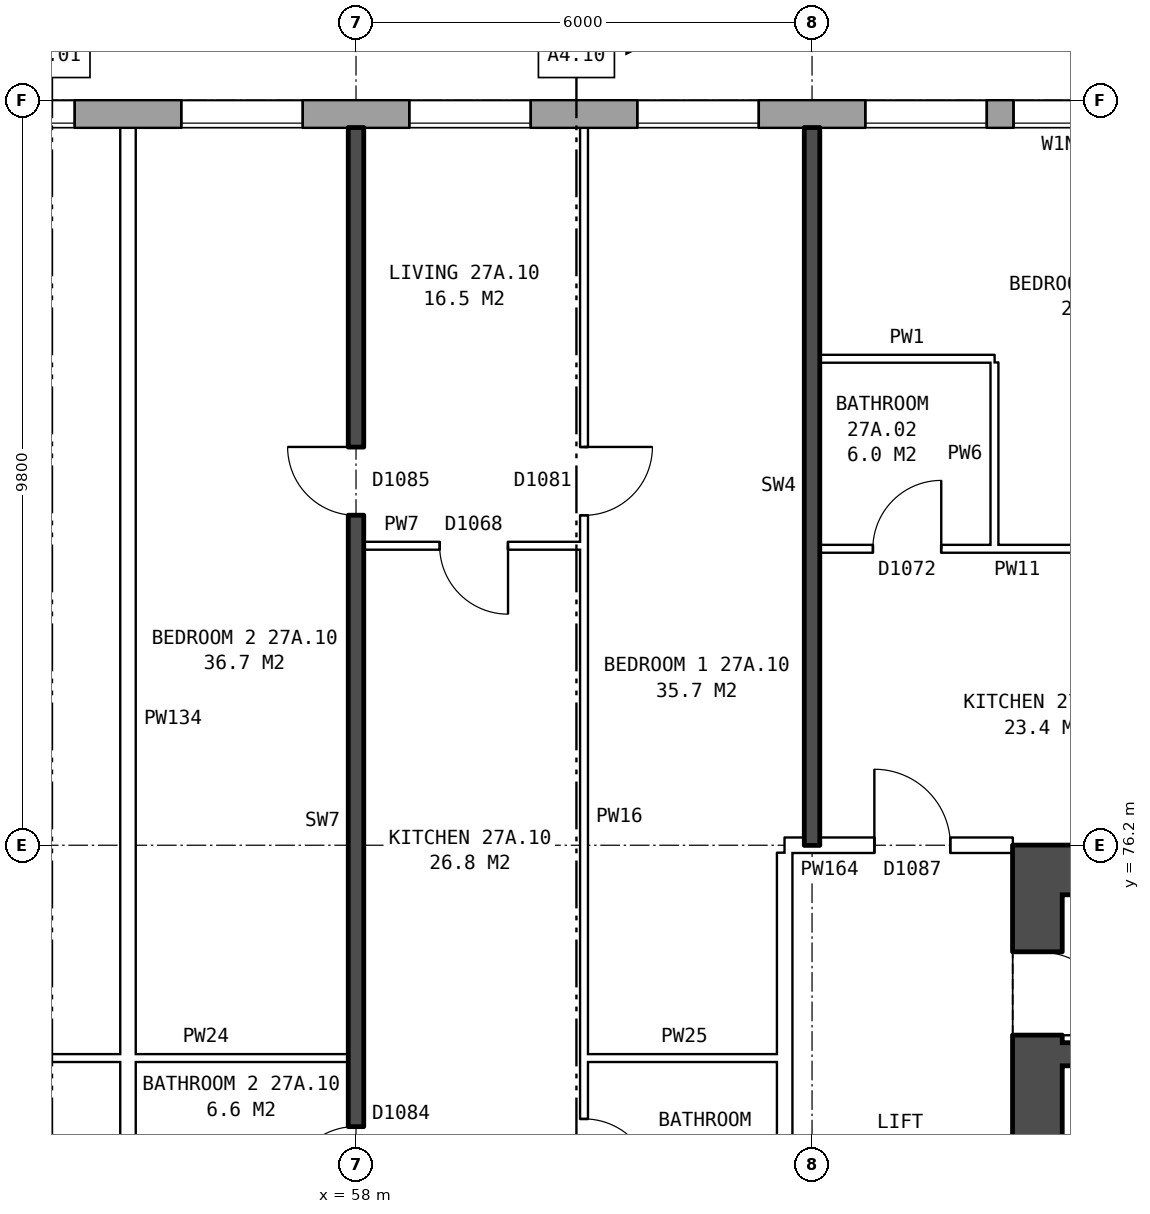
"""IFC4 building model, lengths in metres.
Left out: names, types, materials, properties, quantities, classifications, styles, units other than length and angle.
Written with IfcOpenShell. Run it as: python <this file> out.ifc"""

import sys

from ifc_helpers import new_model, si_unit, direction, frame, frame_2d, origin, place, context, subcontext, project, spatial, rectangle, extrude, element, fill, save


model = new_model("IFC4")
c1 = context("Model", 3, precision=1e-05, world=origin(), true_north=direction((0.0, 1.0)))
c2 = subcontext(c1, "Body", "Model", "MODEL_VIEW")
j1 = project(units=[si_unit("LENGTHUNIT", "METRE"), si_unit("PLANEANGLEUNIT", "RADIAN")], contexts=[c1])
p1 = place(None, origin())
s1 = spatial("IfcSite", under=j1, at=p1, CompositionType="ELEMENT")
p2 = place(p1, origin())
s2 = spatial("IfcBuilding", under=s1, at=p2, CompositionType="ELEMENT")
p3 = place(p2, frame((0.0, 0.0, 99.5)))
s3 = spatial("IfcBuildingStorey", under=s2, at=p3, CompositionType="ELEMENT", Elevation=99.5)
p4 = place(p3, frame((72.925, 85.82, 0.0), z_axis=(0.0, 0.0, 1.0), x_axis=(-1.0, 0.0, 0.0)))
e1 = element("IfcWall", 1, at=p4, inside=s3, PredefinedType="STANDARD", context=c2, shape_type="SweptSolid", body=[
    extrude(rectangle(XDim=44.851, YDim=0.36, at=frame_2d((22.425, 0.0))), origin(), (0.0, 0.0, 1.0), 2.85),
])
p5 = place(p4, frame((0.625, 0.0, 0.8)))
e2 = element("IfcOpeningElement", 2, at=p5, cuts=e1, PredefinedType="OPENING", context=c2, shape_type="SweptSolid", body=[
    extrude(rectangle(XDim=1.6, YDim=1.8, at=frame_2d((0.8, 0.9))), frame((0.0, 0.19, 0.0), z_axis=(0.0, -1.0, 0.0), x_axis=(1.0, 0.0, 0.0)), (0.0, 0.0, 1.0), 0.38),
])
p6 = place(p4, frame((5.075, 0.0, 0.8)))
e3 = element("IfcOpeningElement", 3, at=p6, cuts=e1, PredefinedType="OPENING", context=c2, shape_type="SweptSolid", body=[
    extrude(rectangle(XDim=1.2, YDim=1.2, at=frame_2d((0.6, 0.6))), frame((0.0, 0.19, 0.0), z_axis=(0.0, -1.0, 0.0), x_axis=(1.0, 0.0, 0.0)), (0.0, 0.0, 1.0), 0.38),
])
p7 = place(p4, frame((6.625, 0.0, 0.8)))
e4 = element("IfcOpeningElement", 4, at=p7, cuts=e1, PredefinedType="OPENING", context=c2, shape_type="SweptSolid", body=[
    extrude(rectangle(XDim=1.6, YDim=1.8, at=frame_2d((0.8, 0.9))), frame((0.0, 0.19, 0.0), z_axis=(0.0, -1.0, 0.0), x_axis=(1.0, 0.0, 0.0)), (0.0, 0.0, 1.0), 0.38),
])
p8 = place(p4, frame((9.625, 0.0, 0.8)))
e5 = element("IfcOpeningElement", 5, at=p8, cuts=e1, PredefinedType="OPENING", context=c2, shape_type="SweptSolid", body=[
    extrude(rectangle(XDim=1.6, YDim=1.8, at=frame_2d((0.8, 0.9))), frame((0.0, 0.19, 0.0), z_axis=(0.0, -1.0, 0.0), x_axis=(1.0, 0.0, 0.0)), (0.0, 0.0, 1.0), 0.38),
])
p9 = place(p4, frame((12.625, 0.0, 0.8)))
e6 = element("IfcOpeningElement", 6, at=p9, cuts=e1, PredefinedType="OPENING", context=c2, shape_type="SweptSolid", body=[
    extrude(rectangle(XDim=1.6, YDim=1.8, at=frame_2d((0.8, 0.9))), frame((0.0, 0.19, 0.0), z_axis=(0.0, -1.0, 0.0), x_axis=(1.0, 0.0, 0.0)), (0.0, 0.0, 1.0), 0.38),
])
p10 = place(p4, frame((15.625, 0.0, 0.8)))
e7 = element("IfcOpeningElement", 7, at=p10, cuts=e1, PredefinedType="OPENING", context=c2, shape_type="SweptSolid", body=[
    extrude(rectangle(XDim=1.6, YDim=1.8, at=frame_2d((0.8, 0.9))), frame((0.0, 0.19, 0.0), z_axis=(0.0, -1.0, 0.0), x_axis=(1.0, 0.0, 0.0)), (0.0, 0.0, 1.0), 0.38),
])
p11 = place(p4, frame((18.625, 0.0, 0.8)))
e8 = element("IfcOpeningElement", 8, at=p11, cuts=e1, PredefinedType="OPENING", context=c2, shape_type="SweptSolid", body=[
    extrude(rectangle(XDim=1.6, YDim=1.8, at=frame_2d((0.8, 0.9))), frame((0.0, 0.19, 0.0), z_axis=(0.0, -1.0, 0.0), x_axis=(1.0, 0.0, 0.0)), (0.0, 0.0, 1.0), 0.38),
])
p12 = place(p4, frame((21.625, 0.0, 0.8)))
e9 = element("IfcOpeningElement", 9, at=p12, cuts=e1, PredefinedType="OPENING", context=c2, shape_type="SweptSolid", body=[
    extrude(rectangle(XDim=1.6, YDim=1.8, at=frame_2d((0.8, 0.9))), frame((0.0, 0.19, 0.0), z_axis=(0.0, -1.0, 0.0), x_axis=(1.0, 0.0, 0.0)), (0.0, 0.0, 1.0), 0.38),
])
p13 = place(p4, frame((24.625, 0.0, 0.8)))
e10 = element("IfcOpeningElement", 10, at=p13, cuts=e1, PredefinedType="OPENING", context=c2, shape_type="SweptSolid", body=[
    extrude(rectangle(XDim=1.6, YDim=1.8, at=frame_2d((0.8, 0.9))), frame((0.0, 0.19, 0.0), z_axis=(0.0, -1.0, 0.0), x_axis=(1.0, 0.0, 0.0)), (0.0, 0.0, 1.0), 0.38),
])
p14 = place(p4, frame((27.625, 0.0, 0.8)))
e11 = element("IfcOpeningElement", 11, at=p14, cuts=e1, PredefinedType="OPENING", context=c2, shape_type="SweptSolid", body=[
    extrude(rectangle(XDim=1.6, YDim=1.8, at=frame_2d((0.8, 0.9))), frame((0.0, 0.19, 0.0), z_axis=(0.0, -1.0, 0.0), x_axis=(1.0, 0.0, 0.0)), (0.0, 0.0, 1.0), 0.38),
])
p15 = place(p4, frame((30.625, 0.0, 0.8)))
e12 = element("IfcOpeningElement", 12, at=p15, cuts=e1, PredefinedType="OPENING", context=c2, shape_type="SweptSolid", body=[
    extrude(rectangle(XDim=1.6, YDim=1.8, at=frame_2d((0.8, 0.9))), frame((0.0, 0.19, 0.0), z_axis=(0.0, -1.0, 0.0), x_axis=(1.0, 0.0, 0.0)), (0.0, 0.0, 1.0), 0.38),
])
p16 = place(p4, frame((33.625, 0.0, 0.8)))
e13 = element("IfcOpeningElement", 13, at=p16, cuts=e1, PredefinedType="OPENING", context=c2, shape_type="SweptSolid", body=[
    extrude(rectangle(XDim=1.6, YDim=1.8, at=frame_2d((0.8, 0.9))), frame((0.0, 0.19, 0.0), z_axis=(0.0, -1.0, 0.0), x_axis=(1.0, 0.0, 0.0)), (0.0, 0.0, 1.0), 0.38),
])
p17 = place(p4, frame((36.625, 0.0, 0.8)))
e14 = element("IfcOpeningElement", 14, at=p17, cuts=e1, PredefinedType="OPENING", context=c2, shape_type="SweptSolid", body=[
    extrude(rectangle(XDim=1.6, YDim=1.8, at=frame_2d((0.8, 0.9))), frame((0.0, 0.19, 0.0), z_axis=(0.0, -1.0, 0.0), x_axis=(1.0, 0.0, 0.0)), (0.0, 0.0, 1.0), 0.38),
])
p18 = place(p4, frame((39.125, 0.0, 0.8)))
e15 = element("IfcOpeningElement", 15, at=p18, cuts=e1, PredefinedType="OPENING", context=c2, shape_type="SweptSolid", body=[
    extrude(rectangle(XDim=1.0, YDim=0.9, at=frame_2d((0.5, 0.45))), frame((0.0, 0.19, 0.0), z_axis=(0.0, -1.0, 0.0), x_axis=(1.0, 0.0, 0.0)), (0.0, 0.0, 1.0), 0.38),
])
p19 = place(p4, frame((42.625, 0.0, 0.8)))
e16 = element("IfcOpeningElement", 16, at=p19, cuts=e1, PredefinedType="OPENING", context=c2, shape_type="SweptSolid", body=[
    extrude(rectangle(XDim=1.6, YDim=1.8, at=frame_2d((0.8, 0.9))), frame((0.0, 0.19, 0.0), z_axis=(0.0, -1.0, 0.0), x_axis=(1.0, 0.0, 0.0)), (0.0, 0.0, 1.0), 0.38),
])
p20 = place(p4, frame((41.425, 0.0, 1.7)))
e17 = element("IfcOpeningElement", 17, at=p20, cuts=e1, PredefinedType="OPENING", context=c2, shape_type="SweptSolid", body=[
    extrude(rectangle(XDim=0.8, YDim=0.9, at=frame_2d((0.4, 0.45))), frame((0.0, 0.19, 0.0), z_axis=(0.0, -1.0, 0.0), x_axis=(1.0, 0.0, 0.0)), (0.0, 0.0, 1.0), 0.38),
])
p21 = place(p3, frame((66.965, 64.45, 0.0), z_axis=(0.0, 0.0, 1.0), x_axis=(0.0, 1.0, 0.0)))
e18 = element("IfcWall", 18, at=p21, inside=s3, PredefinedType="SHEAR", context=c2, shape_type="SweptSolid", body=[
    extrude(rectangle(XDim=11.1, YDim=0.65, at=frame_2d((5.55, 0.0))), origin(), (0.0, 0.0, 1.0), 2.85),
])
p22 = place(p21, frame((0.675, 0.0, 0.0)))
e19 = element("IfcOpeningElement", 19, at=p22, cuts=e18, PredefinedType="OPENING", context=c2, shape_type="SweptSolid", body=[
    extrude(rectangle(XDim=1.1, YDim=2.1, at=frame_2d((0.55, 1.05))), frame((0.0, 0.335, 0.0), z_axis=(0.0, -1.0, 0.0), x_axis=(1.0, 0.0, 0.0)), (0.0, 0.0, 1.0), 0.67),
])
p23 = place(p21, frame((9.25, 0.0, 0.0)))
e20 = element("IfcOpeningElement", 20, at=p23, cuts=e18, PredefinedType="OPENING", context=c2, shape_type="SweptSolid", body=[
    extrude(rectangle(XDim=1.1, YDim=2.1, at=frame_2d((0.55, 1.05))), frame((0.0, 0.335, 0.0), z_axis=(0.0, -1.0, 0.0), x_axis=(1.0, 0.0, 0.0)), (0.0, 0.0, 1.0), 0.67),
])
p24 = place(p3, frame((66.64, 75.875, 0.0), z_axis=(0.0, 0.0, 1.0), x_axis=(1.0, 0.0, 0.0)))
e21 = element("IfcWall", 21, at=p24, inside=s3, PredefinedType="SHEAR", context=c2, shape_type="SweptSolid", body=[
    extrude(rectangle(XDim=9.0, YDim=0.65, at=frame_2d((4.5, 0.0))), origin(), (0.0, 0.0, 1.0), 2.85),
])
p25 = place(p3, frame((67.29, 73.45, 0.0), z_axis=(0.0, 0.0, 1.0), x_axis=(1.0, 0.0, 0.0)))
e22 = element("IfcWall", 22, at=p25, inside=s3, PredefinedType="SHEAR", context=c2, shape_type="SweptSolid", body=[
    extrude(rectangle(XDim=2.25, YDim=0.3, at=frame_2d((1.125, 0.0))), origin(), (0.0, 0.0, 1.0), 2.85),
])
p26 = place(p3, frame((63.64, 63.9, 0.0), z_axis=(0.0, 0.0, 1.0), x_axis=(0.0, 1.0, 0.0)))
e23 = element("IfcWall", 23, at=p26, inside=s3, PredefinedType="PARTITIONING", context=c2, shape_type="SweptSolid", body=[
    extrude(rectangle(XDim=12.2, YDim=0.2, at=frame_2d((6.1, 0.0))), origin(), (0.0, 0.0, 1.0), 2.85),
])
p27 = place(p26, frame((5.1, 0.0, 0.0)))
e24 = element("IfcOpeningElement", 24, at=p27, cuts=e23, PredefinedType="OPENING", context=c2, shape_type="SweptSolid", body=[
    extrude(rectangle(XDim=2.0, YDim=2.1, at=frame_2d((1.0, 1.05))), frame((0.0, 0.11, 0.0), z_axis=(0.0, -1.0, 0.0), x_axis=(1.0, 0.0, 0.0)), (0.0, 0.0, 1.0), 0.22),
])
p28 = place(p3, frame((52.1, 73.4, 0.0), z_axis=(0.0, 0.0, 1.0), x_axis=(1.0, 0.0, 0.0)))
e25 = element("IfcWall", 25, at=p28, inside=s3, PredefinedType="PARTITIONING", context=c2, shape_type="SweptSolid", body=[
    extrude(rectangle(XDim=5.8, YDim=0.1, at=frame_2d((2.9, 0.0))), origin(), (0.0, 0.0, 1.0), 2.85),
])
p29 = place(p3, frame((61.0, 73.4, 0.0), z_axis=(0.0, 0.0, 1.0), x_axis=(1.0, 0.0, 0.0)))
e26 = element("IfcWall", 26, at=p29, inside=s3, PredefinedType="PARTITIONING", context=c2, shape_type="SweptSolid", body=[
    extrude(rectangle(XDim=2.64, YDim=0.1, at=frame_2d((1.32, 0.0))), origin(), (0.0, 0.0, 1.0), 2.85),
])
p30 = place(p3, frame((63.64, 76.2, 0.0), z_axis=(0.0, 0.0, 1.0), x_axis=(1.0, 0.0, 0.0)))
e27 = element("IfcWall", 27, at=p30, inside=s3, PredefinedType="PARTITIONING", context=c2, shape_type="SweptSolid", body=[
    extrude(rectangle(XDim=3.0, YDim=0.2, at=frame_2d((1.5, 0.0))), origin(), (0.0, 0.0, 1.0), 2.85),
])
p31 = place(p30, frame((1.18, 0.0, 0.0)))
e28 = element("IfcOpeningElement", 28, at=p31, cuts=e27, PredefinedType="OPENING", context=c2, shape_type="SweptSolid", body=[
    extrude(rectangle(XDim=1.0, YDim=2.1, at=frame_2d((0.5, 1.05))), frame((0.0, 0.11, 0.0), z_axis=(0.0, -1.0, 0.0), x_axis=(1.0, 0.0, 0.0)), (0.0, 0.0, 1.0), 0.22),
])
p32 = place(p3, frame((64.1, 80.1, 0.0), z_axis=(0.0, 0.0, 1.0), x_axis=(1.0, 0.0, 0.0)))
e29 = element("IfcWall", 29, at=p32, inside=s3, PredefinedType="PARTITIONING", context=c2, shape_type="SweptSolid", body=[
    extrude(rectangle(XDim=5.8, YDim=0.1, at=frame_2d((2.9, 0.0))), origin(), (0.0, 0.0, 1.0), 2.85),
])
p33 = place(p32, frame((3.6, 0.0, 0.0)))
e30 = element("IfcOpeningElement", 30, at=p33, cuts=e29, PredefinedType="OPENING", context=c2, shape_type="SweptSolid", body=[
    extrude(rectangle(XDim=0.9, YDim=2.1, at=frame_2d((0.45, 1.05))), frame((0.0, 0.06, 0.0), z_axis=(0.0, -1.0, 0.0), x_axis=(1.0, 0.0, 0.0)), (0.0, 0.0, 1.0), 0.12),
])
p34 = place(p32, frame((0.7, 0.0, 0.0)))
e31 = element("IfcOpeningElement", 31, at=p34, cuts=e29, PredefinedType="OPENING", context=c2, shape_type="SweptSolid", body=[
    extrude(rectangle(XDim=0.9, YDim=2.1, at=frame_2d((0.45, 1.05))), frame((0.0, 0.06, 0.0), z_axis=(0.0, -1.0, 0.0), x_axis=(1.0, 0.0, 0.0)), (0.0, 0.0, 1.0), 0.12),
])
p35 = place(p3, frame((58.1, 80.14, 0.0), z_axis=(0.0, 0.0, 1.0), x_axis=(1.0, 0.0, 0.0)))
e32 = element("IfcWall", 32, at=p35, inside=s3, PredefinedType="PARTITIONING", context=c2, shape_type="SweptSolid", body=[
    extrude(rectangle(XDim=2.9, YDim=0.1, at=frame_2d((1.45, 0.0))), origin(), (0.0, 0.0, 1.0), 2.85),
])
p36 = place(p35, frame((1.0, 0.0, 0.0)))
e33 = element("IfcOpeningElement", 33, at=p36, cuts=e32, PredefinedType="OPENING", context=c2, shape_type="SweptSolid", body=[
    extrude(rectangle(XDim=0.9, YDim=2.1, at=frame_2d((0.45, 1.05))), frame((0.0, 0.06, 0.0), z_axis=(0.0, -1.0, 0.0), x_axis=(1.0, 0.0, 0.0)), (0.0, 0.0, 1.0), 0.12),
])
p37 = place(p3, frame((64.1, 82.6, 0.0), z_axis=(0.0, 0.0, 1.0), x_axis=(1.0, 0.0, 0.0)))
e34 = element("IfcWall", 34, at=p37, inside=s3, PredefinedType="PARTITIONING", context=c2, shape_type="SweptSolid", body=[
    extrude(rectangle(XDim=2.3, YDim=0.1, at=frame_2d((1.15, 0.0))), origin(), (0.0, 0.0, 1.0), 2.85),
])
p38 = place(p3, frame((55.0, 71.3, 0.0), z_axis=(0.0, 0.0, 1.0), x_axis=(0.0, 1.0, 0.0)))
e35 = element("IfcWall", 35, at=p38, inside=s3, PredefinedType="PARTITIONING", context=c2, shape_type="SweptSolid", body=[
    extrude(rectangle(XDim=14.34, YDim=0.2, at=frame_2d((7.17, 0.0))), origin(), (0.0, 0.0, 1.0), 2.85),
])
p39 = place(p3, frame((58.0, 71.2, 0.0), z_axis=(0.0, 0.0, 1.0), x_axis=(0.0, 1.0, 0.0)))
e36 = element("IfcWall", 36, at=p39, inside=s3, PredefinedType="SOLIDWALL", context=c2, shape_type="SweptSolid", body=[
    extrude(rectangle(XDim=14.44, YDim=0.2, at=frame_2d((7.22, 0.0))), origin(), (0.0, 0.0, 1.0), 2.85),
])
p40 = place(p39, frame((9.34, 0.0, 0.0)))
e37 = element("IfcOpeningElement", 37, at=p40, cuts=e36, PredefinedType="OPENING", context=c2, shape_type="SweptSolid", body=[
    extrude(rectangle(XDim=0.9, YDim=2.1, at=frame_2d((0.45, 1.05))), frame((0.0, 0.11, 0.0), z_axis=(0.0, -1.0, 0.0), x_axis=(1.0, 0.0, 0.0)), (0.0, 0.0, 1.0), 0.22),
])
p41 = place(p39, frame((0.4, 0.0, 0.0)))
e38 = element("IfcOpeningElement", 38, at=p41, cuts=e36, PredefinedType="OPENING", context=c2, shape_type="SweptSolid", body=[
    extrude(rectangle(XDim=0.9, YDim=2.1, at=frame_2d((0.45, 1.05))), frame((0.0, 0.11, 0.0), z_axis=(0.0, -1.0, 0.0), x_axis=(1.0, 0.0, 0.0)), (0.0, 0.0, 1.0), 0.22),
])
p42 = place(p3, frame((61.0, 71.3, 0.0), z_axis=(0.0, 0.0, 1.0), x_axis=(0.0, 1.0, 0.0)))
e39 = element("IfcWall", 39, at=p42, inside=s3, PredefinedType="PARTITIONING", context=c2, shape_type="SweptSolid", body=[
    extrude(rectangle(XDim=14.34, YDim=0.1, at=frame_2d((7.17, 0.0))), origin(), (0.0, 0.0, 1.0), 2.85),
])
p43 = place(p42, frame((9.24, 0.0, 0.0)))
e40 = element("IfcOpeningElement", 40, at=p43, cuts=e39, PredefinedType="OPENING", context=c2, shape_type="SweptSolid", body=[
    extrude(rectangle(XDim=0.9, YDim=2.1, at=frame_2d((0.45, 1.05))), frame((0.0, 0.06, 0.0), z_axis=(0.0, -1.0, 0.0), x_axis=(1.0, 0.0, 0.0)), (0.0, 0.0, 1.0), 0.12),
])
p44 = place(p42, frame((0.4, 0.0, 0.0)))
e41 = element("IfcOpeningElement", 41, at=p44, cuts=e39, PredefinedType="OPENING", context=c2, shape_type="SweptSolid", body=[
    extrude(rectangle(XDim=0.9, YDim=2.1, at=frame_2d((0.45, 1.05))), frame((0.0, 0.06, 0.0), z_axis=(0.0, -1.0, 0.0), x_axis=(1.0, 0.0, 0.0)), (0.0, 0.0, 1.0), 0.12),
])
p45 = place(p3, frame((64.0, 76.2, 0.0), z_axis=(0.0, 0.0, 1.0), x_axis=(0.0, 1.0, 0.0)))
e42 = element("IfcWall", 42, at=p45, inside=s3, PredefinedType="SOLIDWALL", context=c2, shape_type="SweptSolid", body=[
    extrude(rectangle(XDim=9.44, YDim=0.2, at=frame_2d((4.72, 0.0))), origin(), (0.0, 0.0, 1.0), 2.85),
])
p46 = place(p3, frame((66.4, 80.15, 0.0), z_axis=(0.0, 0.0, 1.0), x_axis=(0.0, 1.0, 0.0)))
e43 = element("IfcWall", 43, at=p46, inside=s3, PredefinedType="PARTITIONING", context=c2, shape_type="SweptSolid", body=[
    extrude(rectangle(XDim=2.4, YDim=0.1, at=frame_2d((1.2, 0.0))), origin(), (0.0, 0.0, 1.0), 2.85),
])
p47 = place(p6, origin())
e44 = element("IfcWindow", 44, at=p47, inside=s3, PartitioningType="SINGLE_PANEL", PredefinedType="WINDOW", context=c2, shape_type="SweptSolid", body=[
    extrude(rectangle(XDim=1.2, YDim=1.2, at=frame_2d((0.6, 0.6))), frame((0.0, 0.15, 0.0), z_axis=(0.0, -1.0, 0.0), x_axis=(1.0, 0.0, 0.0)), (0.0, 0.0, 1.0), 0.06),
])
fill(e3, e44)
p48 = place(p7, origin())
e45 = element("IfcWindow", 45, at=p48, inside=s3, PartitioningType="SINGLE_PANEL", PredefinedType="WINDOW", context=c2, shape_type="SweptSolid", body=[
    extrude(rectangle(XDim=1.6, YDim=1.8, at=frame_2d((0.8, 0.9))), frame((0.0, 0.15, 0.0), z_axis=(0.0, -1.0, 0.0), x_axis=(1.0, 0.0, 0.0)), (0.0, 0.0, 1.0), 0.06),
])
fill(e4, e45)
p49 = place(p8, origin())
e46 = element("IfcWindow", 46, at=p49, inside=s3, PartitioningType="SINGLE_PANEL", PredefinedType="WINDOW", context=c2, shape_type="SweptSolid", body=[
    extrude(rectangle(XDim=1.6, YDim=1.8, at=frame_2d((0.8, 0.9))), frame((0.0, 0.15, 0.0), z_axis=(0.0, -1.0, 0.0), x_axis=(1.0, 0.0, 0.0)), (0.0, 0.0, 1.0), 0.06),
])
fill(e5, e46)
p50 = place(p9, origin())
e47 = element("IfcWindow", 47, at=p50, inside=s3, PartitioningType="SINGLE_PANEL", PredefinedType="WINDOW", context=c2, shape_type="SweptSolid", body=[
    extrude(rectangle(XDim=1.6, YDim=1.8, at=frame_2d((0.8, 0.9))), frame((0.0, 0.15, 0.0), z_axis=(0.0, -1.0, 0.0), x_axis=(1.0, 0.0, 0.0)), (0.0, 0.0, 1.0), 0.06),
])
fill(e6, e47)
p51 = place(p10, origin())
e48 = element("IfcWindow", 48, at=p51, inside=s3, PartitioningType="SINGLE_PANEL", PredefinedType="WINDOW", context=c2, shape_type="SweptSolid", body=[
    extrude(rectangle(XDim=1.6, YDim=1.8, at=frame_2d((0.8, 0.9))), frame((0.0, 0.15, 0.0), z_axis=(0.0, -1.0, 0.0), x_axis=(1.0, 0.0, 0.0)), (0.0, 0.0, 1.0), 0.06),
])
fill(e7, e48)
p52 = place(p11, origin())
e49 = element("IfcWindow", 49, at=p52, inside=s3, PartitioningType="SINGLE_PANEL", PredefinedType="WINDOW", context=c2, shape_type="SweptSolid", body=[
    extrude(rectangle(XDim=1.6, YDim=1.8, at=frame_2d((0.8, 0.9))), frame((0.0, 0.15, 0.0), z_axis=(0.0, -1.0, 0.0), x_axis=(1.0, 0.0, 0.0)), (0.0, 0.0, 1.0), 0.06),
])
fill(e8, e49)
p53 = place(p23, frame((1.1, 0.0, 0.0), z_axis=(0.0, 0.0, 1.0), x_axis=(-1.0, 0.0, 0.0)))
e50 = element("IfcDoor", 50, at=p53, inside=s3, OperationType="SINGLE_SWING_RIGHT", PredefinedType="DOOR", context=c2, shape_type="SweptSolid", body=[
    extrude(rectangle(XDim=1.1, YDim=2.1, at=frame_2d((0.55, 1.05))), frame((0.0, 0.31, 0.0), z_axis=(0.0, -1.0, 0.0), x_axis=(1.0, 0.0, 0.0)), (0.0, 0.0, 1.0), 0.05),
])
fill(e20, e50)
p54 = place(p31, origin())
e51 = element("IfcDoor", 51, at=p54, inside=s3, OperationType="SINGLE_SWING_LEFT", PredefinedType="DOOR", context=c2, shape_type="SweptSolid", body=[
    extrude(rectangle(XDim=1.0, YDim=2.1, at=frame_2d((0.5, 1.05))), frame((0.0, 0.025, 0.0), z_axis=(0.0, -1.0, 0.0), x_axis=(1.0, 0.0, 0.0)), (0.0, 0.0, 1.0), 0.05),
])
fill(e28, e51)
p55 = place(p34, origin())
e52 = element("IfcDoor", 52, at=p55, inside=s3, OperationType="SINGLE_SWING_RIGHT", PredefinedType="DOOR", context=c2, shape_type="SweptSolid", body=[
    extrude(rectangle(XDim=0.9, YDim=2.1, at=frame_2d((0.45, 1.05))), frame((0.0, 0.025, 0.0), z_axis=(0.0, -1.0, 0.0), x_axis=(1.0, 0.0, 0.0)), (0.0, 0.0, 1.0), 0.05),
])
fill(e31, e52)
p56 = place(p43, frame((0.9, 0.0, 0.0), z_axis=(0.0, 0.0, 1.0), x_axis=(-1.0, 0.0, 0.0)))
e53 = element("IfcDoor", 53, at=p56, inside=s3, OperationType="SINGLE_SWING_LEFT", PredefinedType="DOOR", context=c2, shape_type="SweptSolid", body=[
    extrude(rectangle(XDim=0.9, YDim=2.1, at=frame_2d((0.45, 1.05))), frame((0.0, 0.025, 0.0), z_axis=(0.0, -1.0, 0.0), x_axis=(1.0, 0.0, 0.0)), (0.0, 0.0, 1.0), 0.05),
])
fill(e40, e53)
p57 = place(p40, origin())
e54 = element("IfcDoor", 54, at=p57, inside=s3, OperationType="SINGLE_SWING_RIGHT", PredefinedType="DOOR", context=c2, shape_type="SweptSolid", body=[
    extrude(rectangle(XDim=0.9, YDim=2.1, at=frame_2d((0.45, 1.05))), frame((0.0, 0.025, 0.0), z_axis=(0.0, -1.0, 0.0), x_axis=(1.0, 0.0, 0.0)), (0.0, 0.0, 1.0), 0.05),
])
fill(e37, e54)
p58 = place(p36, frame((0.9, 0.0, 0.0), z_axis=(0.0, 0.0, 1.0), x_axis=(-1.0, 0.0, 0.0)))
e55 = element("IfcDoor", 55, at=p58, inside=s3, OperationType="SINGLE_SWING_LEFT", PredefinedType="DOOR", context=c2, shape_type="SweptSolid", body=[
    extrude(rectangle(XDim=0.9, YDim=2.1, at=frame_2d((0.45, 1.05))), frame((0.0, 0.025, 0.0), z_axis=(0.0, -1.0, 0.0), x_axis=(1.0, 0.0, 0.0)), (0.0, 0.0, 1.0), 0.05),
])
fill(e33, e55)
p59 = place(p44, frame((0.9, 0.0, 0.0), z_axis=(0.0, 0.0, 1.0), x_axis=(-1.0, 0.0, 0.0)))
e56 = element("IfcDoor", 56, at=p59, inside=s3, OperationType="SINGLE_SWING_RIGHT", PredefinedType="DOOR", context=c2, shape_type="SweptSolid", body=[
    extrude(rectangle(XDim=0.9, YDim=2.1, at=frame_2d((0.45, 1.05))), frame((0.0, 0.025, 0.0), z_axis=(0.0, -1.0, 0.0), x_axis=(1.0, 0.0, 0.0)), (0.0, 0.0, 1.0), 0.05),
])
fill(e41, e56)
p60 = place(p41, origin())
e57 = element("IfcDoor", 57, at=p60, inside=s3, OperationType="SINGLE_SWING_LEFT", PredefinedType="DOOR", context=c2, shape_type="SweptSolid", body=[
    extrude(rectangle(XDim=0.9, YDim=2.1, at=frame_2d((0.45, 1.05))), frame((0.0, 0.025, 0.0), z_axis=(0.0, -1.0, 0.0), x_axis=(1.0, 0.0, 0.0)), (0.0, 0.0, 1.0), 0.05),
])
fill(e38, e57)
save(model, sys.argv[1])
